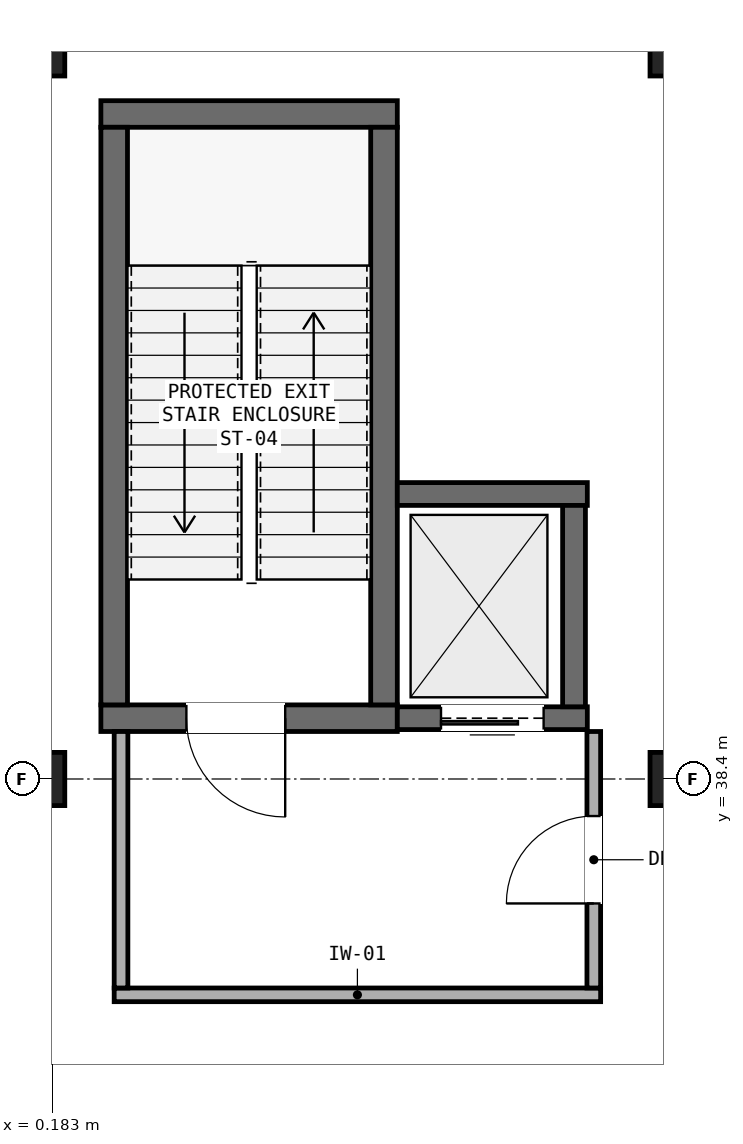
"""IFC4 building model, lengths in metres.
Left out: names, types, materials, properties, quantities, classifications, styles, units other than length and angle.
Written with IfcOpenShell. Run it as: python <this file> out.ifc"""

import sys

from ifc_helpers import new_model, si_unit, direction, frame, frame_2d, origin, origin_2d, place, context, subcontext, project, spatial, rectangle, extrude, element, fill, save


model = new_model("IFC4")
c1 = context("Model", 3, precision=1e-05, world=origin(), true_north=direction((0.0, 1.0)))
c2 = subcontext(c1, "Body", "Model", "MODEL_VIEW")
j1 = project(units=[si_unit("LENGTHUNIT", "METRE"), si_unit("PLANEANGLEUNIT", "RADIAN")], contexts=[c1])
p1 = place(None, origin())
s1 = spatial("IfcSite", under=j1, at=p1, CompositionType="ELEMENT")
p2 = place(p1, origin())
s2 = spatial("IfcBuilding", under=s1, at=p2, CompositionType="ELEMENT")
p3 = place(p2, frame((0.0, 0.0, -9.8)))
s3 = spatial("IfcBuildingStorey", under=s2, at=p3, CompositionType="ELEMENT", Elevation=-9.8)
for number, where, z_axis, x_axis in (
    (1, (0.0, 38.4, 0.0), (0.0, 0.0, 1.0), (1.0, 0.0, 0.0)),
    (2, (8.4, 38.4, 0.0), (0.0, 0.0, 1.0), (1.0, 0.0, 0.0)),
    (3, (0.0, 48.0, 0.0), (0.0, 0.0, 1.0), (1.0, 0.0, 0.0)),
    (4, (8.4, 48.0, 0.0), (0.0, 0.0, 1.0), (1.0, 0.0, 0.0)),
):
    element("IfcColumn", number, at=place(p3, frame(where, z_axis=z_axis, x_axis=x_axis)), inside=s3, PredefinedType="COLUMN", context=c2, shape_type="SweptSolid", body=[
        extrude(rectangle(XDim=0.7, YDim=0.7, at=origin_2d()), origin(), (0.0, 0.0, 1.0), 5.25),
    ])
p4 = place(p3, frame((0.825, 39.2, 0.0), z_axis=(0.0, 0.0, 1.0), x_axis=(1.0, 0.0, 0.0)))
e5 = element("IfcWall", 5, at=p4, inside=s3, PredefinedType="SHEAR", context=c2, shape_type="SweptSolid", body=[
    extrude(rectangle(XDim=3.9, YDim=0.35, at=frame_2d((1.95, 0.0))), origin(), (0.0, 0.0, 1.0), 4.97),
])
p5 = place(p4, frame((1.125, 0.0, 0.0)))
e6 = element("IfcOpeningElement", 6, at=p5, cuts=e5, PredefinedType="OPENING", context=c2, shape_type="SweptSolid", body=[
    extrude(rectangle(XDim=1.3, YDim=2.15, at=frame_2d((0.65, 1.075))), frame((0.0, 0.185, 0.0), z_axis=(0.0, -1.0, 0.0), x_axis=(1.0, 0.0, 0.0)), (0.0, 0.0, 1.0), 0.37),
])
p6 = place(p3, frame((0.825, 47.15, 0.0), z_axis=(0.0, 0.0, 1.0), x_axis=(1.0, 0.0, 0.0)))
e7 = element("IfcWall", 7, at=p6, inside=s3, PredefinedType="SHEAR", context=c2, shape_type="SweptSolid", body=[
    extrude(rectangle(XDim=3.9, YDim=0.35, at=frame_2d((1.95, 0.0))), origin(), (0.0, 0.0, 1.0), 4.97),
])
for number, where, z_axis, x_axis in (
    (8, (1.0, 39.375, 0.0), (0.0, 0.0, 1.0), (0.0, 1.0, 0.0)),
    (9, (4.55, 39.375, 0.0), (0.0, 0.0, 1.0), (0.0, 1.0, 0.0)),
):
    element("IfcWall", number, at=place(p3, frame(where, z_axis=z_axis, x_axis=x_axis)), inside=s3, PredefinedType="SHEAR", context=c2, shape_type="SweptSolid", body=[
        extrude(rectangle(XDim=7.6, YDim=0.35, at=frame_2d((3.8, 0.0))), origin(), (0.0, 0.0, 1.0), 4.97),
    ])
p7 = place(p3, frame((4.725, 39.2, 0.0), z_axis=(0.0, 0.0, 1.0), x_axis=(1.0, 0.0, 0.0)))
e10 = element("IfcWall", 10, at=p7, inside=s3, PredefinedType="SHEAR", context=c2, shape_type="SweptSolid", body=[
    extrude(rectangle(XDim=2.5, YDim=0.3, at=frame_2d((1.25, 0.0))), origin(), (0.0, 0.0, 1.0), 4.97),
])
p8 = place(p7, frame((0.575, 0.0, 0.0)))
e11 = element("IfcOpeningElement", 11, at=p8, cuts=e10, PredefinedType="OPENING", context=c2, shape_type="SweptSolid", body=[
    extrude(rectangle(XDim=1.35, YDim=2.15, at=frame_2d((0.675, 1.075))), frame((0.0, 0.16, 0.0), z_axis=(0.0, -1.0, 0.0), x_axis=(1.0, 0.0, 0.0)), (0.0, 0.0, 1.0), 0.32),
])
p9 = place(p3, frame((4.725, 42.15, 0.0), z_axis=(0.0, 0.0, 1.0), x_axis=(1.0, 0.0, 0.0)))
e12 = element("IfcWall", 12, at=p9, inside=s3, PredefinedType="SHEAR", context=c2, shape_type="SweptSolid", body=[
    extrude(rectangle(XDim=2.5, YDim=0.3, at=frame_2d((1.25, 0.0))), origin(), (0.0, 0.0, 1.0), 4.97),
])
p10 = place(p3, frame((7.05, 39.35, 0.0), z_axis=(0.0, 0.0, 1.0), x_axis=(0.0, 1.0, 0.0)))
e13 = element("IfcWall", 13, at=p10, inside=s3, PredefinedType="SHEAR", context=c2, shape_type="SweptSolid", body=[
    extrude(rectangle(XDim=2.65, YDim=0.3, at=frame_2d((1.325, 0.0))), origin(), (0.0, 0.0, 1.0), 4.97),
])
p11 = place(p3, frame((1.0, 35.56, 0.0), z_axis=(0.0, 0.0, 1.0), x_axis=(1.0, 0.0, 0.0)))
e14 = element("IfcWall", 14, at=p11, inside=s3, PredefinedType="PARTITIONING", context=c2, shape_type="SweptSolid", body=[
    extrude(rectangle(XDim=6.4, YDim=0.18, at=frame_2d((3.2, 0.0))), origin(), (0.0, 0.0, 1.0), 4.97),
])
p12 = place(p3, frame((1.09, 35.65, 0.0), z_axis=(0.0, 0.0, 1.0), x_axis=(0.0, 1.0, 0.0)))
e15 = element("IfcWall", 15, at=p12, inside=s3, PredefinedType="PARTITIONING", context=c2, shape_type="SweptSolid", body=[
    extrude(rectangle(XDim=3.375, YDim=0.18, at=frame_2d((1.688, 0.0))), origin(), (0.0, 0.0, 1.0), 4.97),
])
p13 = place(p3, frame((7.31, 35.65, 0.0), z_axis=(0.0, 0.0, 1.0), x_axis=(0.0, 1.0, 0.0)))
e16 = element("IfcWall", 16, at=p13, inside=s3, PredefinedType="PARTITIONING", context=c2, shape_type="SweptSolid", body=[
    extrude(rectangle(XDim=3.375, YDim=0.18, at=frame_2d((1.688, 0.0))), origin(), (0.0, 0.0, 1.0), 4.97),
])
p14 = place(p13, frame((1.113, 0.0, 0.0)))
e17 = element("IfcOpeningElement", 17, at=p14, cuts=e16, PredefinedType="OPENING", context=c2, shape_type="SweptSolid", body=[
    extrude(rectangle(XDim=1.15, YDim=2.15, at=frame_2d((0.575, 1.075))), frame((0.0, 0.1, 0.0), z_axis=(0.0, -1.0, 0.0), x_axis=(1.0, 0.0, 0.0)), (0.0, 0.0, 1.0), 0.2),
])
p15 = place(p5, frame((1.3, 0.0, 0.0), z_axis=(0.0, 0.0, 1.0), x_axis=(-1.0, 0.0, 0.0)))
e18 = element("IfcDoor", 18, at=p15, inside=s3, OperationType="SINGLE_SWING_RIGHT", PredefinedType="DOOR", context=c2, shape_type="SweptSolid", body=[
    extrude(rectangle(XDim=1.3, YDim=2.15, at=frame_2d((0.65, 1.075))), frame((0.0, 0.025, 0.0), z_axis=(0.0, -1.0, 0.0), x_axis=(1.0, 0.0, 0.0)), (0.0, 0.0, 1.0), 0.05),
])
fill(e6, e18)
p16 = place(p8, frame((1.35, 0.0, 0.0), z_axis=(0.0, 0.0, 1.0), x_axis=(-1.0, 0.0, 0.0)))
e19 = element("IfcDoor", 19, at=p16, inside=s3, OperationType="SLIDING_TO_RIGHT", PredefinedType="DOOR", context=c2, shape_type="SweptSolid", body=[
    extrude(rectangle(XDim=1.35, YDim=2.15, at=frame_2d((0.675, 1.075))), frame((0.0, 0.025, 0.0), z_axis=(0.0, -1.0, 0.0), x_axis=(1.0, 0.0, 0.0)), (0.0, 0.0, 1.0), 0.05),
])
fill(e11, e19)
p17 = place(p14, origin())
e20 = element("IfcDoor", 20, at=p17, inside=s3, OperationType="SINGLE_SWING_LEFT", PredefinedType="DOOR", context=c2, shape_type="SweptSolid", body=[
    extrude(rectangle(XDim=1.15, YDim=2.15, at=frame_2d((0.575, 1.075))), frame((0.0, 0.025, 0.0), z_axis=(0.0, -1.0, 0.0), x_axis=(1.0, 0.0, 0.0)), (0.0, 0.0, 1.0), 0.05),
])
fill(e17, e20)
save(model, sys.argv[1])
